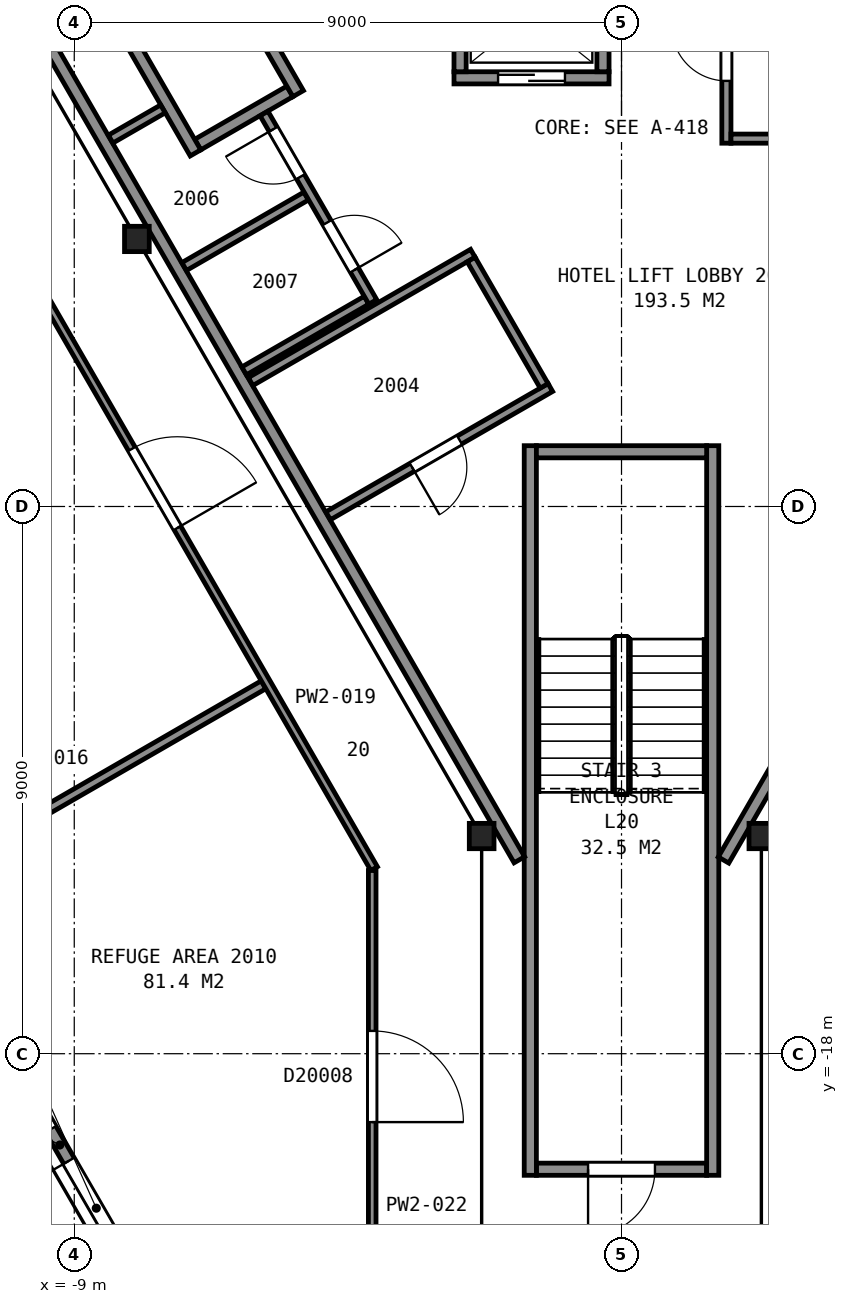
"""IFC4 building model, lengths in metres.
Left out: names, types, materials, properties, quantities, classifications, styles, units other than length and angle.
Written with IfcOpenShell. Run it as: python <this file> out.ifc"""

import sys

from ifc_helpers import new_model, si_unit, direction, frame, frame_2d, origin, origin_2d, place, context, subcontext, project, spatial, rectangle, i_section, extrude, element, fill, save


model = new_model("IFC4")
c1 = context("Model", 3, precision=1e-05, world=origin(), true_north=direction((0.0, 1.0)))
c2 = subcontext(c1, "Body", "Model", "MODEL_VIEW")
j1 = project(units=[si_unit("LENGTHUNIT", "METRE"), si_unit("PLANEANGLEUNIT", "RADIAN")], contexts=[c1])
p1 = place(None, origin())
s1 = spatial("IfcSite", under=j1, at=p1, CompositionType="ELEMENT")
p2 = place(p1, origin())
s2 = spatial("IfcBuilding", under=s1, at=p2, CompositionType="ELEMENT")
p3 = place(p2, frame((0.0, 0.0, 87.2)))
s3 = spatial("IfcBuildingStorey", under=s2, at=p3, CompositionType="ELEMENT", Elevation=87.2)
for number, where, z_axis, x_axis in (
    (1, (-7.97, -4.6, 0.0), (0.0, 0.0, 1.0), (1.0, 0.0, 0.0)),
    (2, (-2.3, -14.42, 0.0), (0.0, 0.0, 1.0), (1.0, 0.0, 0.0)),
    (3, (2.3, -14.42, 0.0), (0.0, 0.0, 1.0), (1.0, 0.0, 0.0)),
):
    element("IfcColumn", number, at=place(p3, frame(where, z_axis=z_axis, x_axis=x_axis)), inside=s3, PredefinedType="COLUMN", context=c2, shape_type="SweptSolid", body=[
        extrude(i_section(OverallWidth=0.406, OverallDepth=0.417, WebThickness=0.03, FlangeThickness=0.048, FilletRadius=0.015, at=origin_2d()), origin(), (0.0, 0.0, 1.0), 5.6),
    ])
p4 = place(p3, frame((-10.188, -17.856, 0.0), z_axis=(0.0, 0.0, 1.0), x_axis=(0.49998037582, -0.866036733513, 0.0)))
e4 = element("IfcWall", 4, at=p4, inside=s3, PredefinedType="SOLIDWALL", context=c2, shape_type="SweptSolid", body=[
    extrude(rectangle(XDim=6.2, YDim=0.2, at=frame_2d((3.1, 0.0))), origin(), (0.0, 0.0, 1.0), 4.323),
])
p5 = place(p4, frame((0.6, 0.0, 0.9)))
e5 = element("IfcOpeningElement", 5, at=p5, cuts=e4, PredefinedType="OPENING", context=c2, shape_type="SweptSolid", body=[
    extrude(rectangle(XDim=1.0, YDim=1.5, at=frame_2d((0.5, 0.75))), frame((0.0, 0.11, 0.0), z_axis=(0.0, -1.0, 0.0), x_axis=(1.0, 0.0, 0.0)), (0.0, 0.0, 1.0), 0.22),
])
p6 = place(p4, frame((2.2, 0.0, 0.0)))
e6 = element("IfcOpeningElement", 6, at=p6, cuts=e4, PredefinedType="OPENING", context=c2, shape_type="SweptSolid", body=[
    extrude(rectangle(XDim=1.8, YDim=2.4, at=frame_2d((0.9, 1.2))), frame((0.0, 0.11, 0.0), z_axis=(0.0, -1.0, 0.0), x_axis=(1.0, 0.0, 0.0)), (0.0, 0.0, 1.0), 0.22),
])
p7 = place(p4, frame((4.6, 0.0, 0.9)))
e7 = element("IfcOpeningElement", 7, at=p7, cuts=e4, PredefinedType="OPENING", context=c2, shape_type="SweptSolid", body=[
    extrude(rectangle(XDim=1.0, YDim=1.5, at=frame_2d((0.5, 0.75))), frame((0.0, 0.11, 0.0), z_axis=(0.0, -1.0, 0.0), x_axis=(1.0, 0.0, 0.0)), (0.0, 0.0, 1.0), 0.22),
])
p8 = place(p3, frame((-1.4, -19.9, 0.0), z_axis=(0.0, 0.0, 1.0), x_axis=(1.0, 0.0, 0.0)))
e8 = element("IfcWall", 8, at=p8, inside=s3, PredefinedType="PARTITIONING", context=c2, shape_type="SweptSolid", body=[
    extrude(rectangle(XDim=2.8, YDim=0.2, at=frame_2d((1.4, 0.0))), origin(), (0.0, 0.0, 1.0), 5.35),
])
p9 = place(p8, frame((0.85, 0.0, 0.0)))
e9 = element("IfcOpeningElement", 9, at=p9, cuts=e8, PredefinedType="OPENING", context=c2, shape_type="SweptSolid", body=[
    extrude(rectangle(XDim=1.1, YDim=2.1, at=frame_2d((0.55, 1.05))), frame((0.0, 0.11, 0.0), z_axis=(0.0, -1.0, 0.0), x_axis=(1.0, 0.0, 0.0)), (0.0, 0.0, 1.0), 0.22),
])
for number, where, z_axis, x_axis in (
    (10, (1.5, -8.0, 0.0), (0.0, 0.0, 1.0), (0.0, -1.0, 0.0)),
    (11, (-1.5, -8.0, 0.0), (0.0, 0.0, 1.0), (0.0, -1.0, 0.0)),
):
    element("IfcWall", number, at=place(p3, frame(where, z_axis=z_axis, x_axis=x_axis)), inside=s3, PredefinedType="PARTITIONING", context=c2, shape_type="SweptSolid", body=[
        extrude(rectangle(XDim=12.0, YDim=0.2, at=frame_2d((6.0, 0.0))), origin(), (0.0, 0.0, 1.0), 5.35),
    ])
p10 = place(p3, frame((-1.4, -8.1, 0.0), z_axis=(0.0, 0.0, 1.0), x_axis=(1.0, 0.0, 0.0)))
e12 = element("IfcWall", 12, at=p10, inside=s3, PredefinedType="PARTITIONING", context=c2, shape_type="SweptSolid", body=[
    extrude(rectangle(XDim=2.8, YDim=0.2, at=frame_2d((1.4, 0.0))), origin(), (0.0, 0.0, 1.0), 5.35),
])
p11 = place(p3, frame((-2.755, -1.95, 0.0), z_axis=(0.0, 0.0, 1.0), x_axis=(1.0, 0.0, 0.0)))
e13 = element("IfcWall", 13, at=p11, inside=s3, PredefinedType="PARTITIONING", context=c2, shape_type="SweptSolid", body=[
    extrude(rectangle(XDim=2.55, YDim=0.2, at=frame_2d((1.275, 0.0))), origin(), (0.0, 0.0, 1.0), 5.6),
])
p12 = place(p11, frame((0.725, 0.0, 0.0)))
e14 = element("IfcOpeningElement", 14, at=p12, cuts=e13, PredefinedType="OPENING", context=c2, shape_type="SweptSolid", body=[
    extrude(rectangle(XDim=1.1, YDim=2.1, at=frame_2d((0.55, 1.05))), frame((0.0, 0.11, 0.0), z_axis=(0.0, -1.0, 0.0), x_axis=(1.0, 0.0, 0.0)), (0.0, 0.0, 1.0), 0.22),
])
for number, where, z_axis, x_axis in (
    (15, (-6.97, -3.048, 0.0), (0.0, 0.0, 1.0), (0.866, 0.5, 0.0)),
    (16, (-0.305, -1.85, 0.0), (0.0, 0.0, 1.0), (0.0, 1.0, 0.0)),
    (17, (-2.655, -1.85, 0.0), (0.0, 0.0, 1.0), (0.0, 1.0, 0.0)),
):
    element("IfcWall", number, at=place(p3, frame(where, z_axis=z_axis, x_axis=x_axis)), inside=s3, PredefinedType="PARTITIONING", context=c2, shape_type="SweptSolid", body=[
        extrude(rectangle(XDim=1.75, YDim=0.2, at=frame_2d((0.875, 0.0))), origin(), (0.0, 0.0, 1.0), 5.6),
    ])
p13 = place(p3, frame((-5.318, -2.21, 0.0), z_axis=(0.0, 0.0, 1.0), x_axis=(-0.499938297808, 0.866061024631, 0.0)))
e18 = element("IfcWall", 18, at=p13, inside=s3, PredefinedType="PARTITIONING", context=c2, shape_type="SweptSolid", body=[
    extrude(rectangle(XDim=2.35, YDim=0.2, at=frame_2d((1.175, 0.0))), origin(), (0.0, 0.0, 1.0), 5.6),
])
p14 = place(p3, frame((-7.006, -3.185, 0.0), z_axis=(0.0, 0.0, 1.0), x_axis=(-0.499990435942, 0.866030925526, 0.0)))
e19 = element("IfcWall", 19, at=p14, inside=s3, PredefinedType="PARTITIONING", context=c2, shape_type="SweptSolid", body=[
    extrude(rectangle(XDim=2.55, YDim=0.2, at=frame_2d((1.275, 0.0))), origin(), (0.0, 0.0, 1.0), 5.6),
])
p15 = place(p3, frame((-13.664, 5.946, 0.0), z_axis=(0.0, 0.0, 1.0), x_axis=(0.499994327219, -0.866028678941, 0.0)))
e20 = element("IfcWall", 20, at=p15, inside=s3, PredefinedType="PARTITIONING", context=c2, shape_type="SweptSolid", body=[
    extrude(rectangle(XDim=23.968, YDim=0.2, at=frame_2d((11.984, 0.0))), origin(), (0.0, 0.0, 1.0), 5.35),
])
p16 = place(p3, frame((-8.402, -2.958, 0.0), z_axis=(0.0, 0.0, 1.0), x_axis=(0.866025935826, 0.499999078476, 0.0)))
e21 = element("IfcWall", 21, at=p16, inside=s3, PredefinedType="PARTITIONING", context=c2, shape_type="SweptSolid", body=[
    extrude(rectangle(XDim=0.993, YDim=0.15, at=frame_2d((0.497, 0.0))), origin(), (0.0, 0.0, 1.0), 5.35),
])
p17 = place(p3, frame((-7.192, -5.053, 0.0), z_axis=(0.0, 0.0, 1.0), x_axis=(0.865851878631, 0.500300434011, 0.0)))
e22 = element("IfcWall", 22, at=p17, inside=s3, PredefinedType="PARTITIONING", context=c2, shape_type="SweptSolid", body=[
    extrude(rectangle(XDim=2.315, YDim=0.15, at=frame_2d((1.158, 0.0))), origin(), (0.0, 0.0, 1.0), 5.35),
])
p18 = place(p3, frame((-6.206, -6.77, 0.0), z_axis=(0.0, 0.0, 1.0), x_axis=(0.865998469481, 0.500046648681, 0.0)))
e23 = element("IfcWall", 23, at=p18, inside=s3, PredefinedType="PARTITIONING", context=c2, shape_type="SweptSolid", body=[
    extrude(rectangle(XDim=2.325, YDim=0.15, at=frame_2d((1.163, 0.0))), origin(), (0.0, 0.0, 1.0), 5.35),
])
p19 = place(p3, frame((-6.1, -6.946, 0.0), z_axis=(0.0, 0.0, 1.0), x_axis=(0.866038200431, 0.499977834903, 0.0)))
e24 = element("IfcWall", 24, at=p19, inside=s3, PredefinedType="PARTITIONING", context=c2, shape_type="SweptSolid", body=[
    extrude(rectangle(XDim=4.22, YDim=0.15, at=frame_2d((2.11, 0.0))), origin(), (0.0, 0.0, 1.0), 5.35),
])
p20 = place(p3, frame((-4.091, -5.635, 0.0), z_axis=(0.0, 0.0, 1.0), x_axis=(-0.499948934428, 0.866054884499, 0.0)))
e25 = element("IfcWall", 25, at=p20, inside=s3, PredefinedType="PARTITIONING", context=c2, shape_type="SweptSolid", body=[
    extrude(rectangle(XDim=3.577, YDim=0.15, at=frame_2d((1.789, 0.0))), origin(), (0.0, 0.0, 1.0), 5.35),
])
p21 = place(p20, frame((2.377, 0.0, 0.0)))
e26 = element("IfcOpeningElement", 26, at=p21, cuts=e25, PredefinedType="OPENING", context=c2, shape_type="SweptSolid", body=[
    extrude(rectangle(XDim=0.9, YDim=2.1, at=frame_2d((0.45, 1.05))), frame((0.0, 0.085, 0.0), z_axis=(0.0, -1.0, 0.0), x_axis=(1.0, 0.0, 0.0)), (0.0, 0.0, 1.0), 0.17),
])
p22 = place(p20, frame((0.605, 0.0, 0.0)))
e27 = element("IfcOpeningElement", 27, at=p22, cuts=e25, PredefinedType="OPENING", context=c2, shape_type="SweptSolid", body=[
    extrude(rectangle(XDim=0.9, YDim=2.1, at=frame_2d((0.45, 1.05))), frame((0.0, 0.085, 0.0), z_axis=(0.0, -1.0, 0.0), x_axis=(1.0, 0.0, 0.0)), (0.0, 0.0, 1.0), 0.17),
])
p23 = place(p3, frame((-4.825, -9.154, 0.0), z_axis=(0.0, 0.0, 1.0), x_axis=(0.866023738697, 0.500002884005, 0.0)))
e28 = element("IfcWall", 28, at=p23, inside=s3, PredefinedType="PARTITIONING", context=c2, shape_type="SweptSolid", body=[
    extrude(rectangle(XDim=4.22, YDim=0.15, at=frame_2d((2.11, 0.0))), origin(), (0.0, 0.0, 1.0), 5.35),
])
p24 = place(p23, frame((1.595, 0.0, 0.0)))
e29 = element("IfcOpeningElement", 29, at=p24, cuts=e28, PredefinedType="OPENING", context=c2, shape_type="SweptSolid", body=[
    extrude(rectangle(XDim=0.9, YDim=2.1, at=frame_2d((0.45, 1.05))), frame((0.0, 0.085, 0.0), z_axis=(0.0, -1.0, 0.0), x_axis=(1.0, 0.0, 0.0)), (0.0, 0.0, 1.0), 0.17),
])
p25 = place(p3, frame((-2.472, -4.938, 0.0), z_axis=(0.0, 0.0, 1.0), x_axis=(0.500045362686, -0.865999212041, 0.0)))
e30 = element("IfcWall", 30, at=p25, inside=s3, PredefinedType="PARTITIONING", context=c2, shape_type="SweptSolid", body=[
    extrude(rectangle(XDim=2.4, YDim=0.15, at=frame_2d((1.2, 0.0))), origin(), (0.0, 0.0, 1.0), 5.35),
])
p26 = place(p3, frame((1.677, -14.815, 0.0), z_axis=(0.0, 0.0, 1.0), x_axis=(0.49999445743, 0.866028603765, 0.0)))
e31 = element("IfcWall", 31, at=p26, inside=s3, PredefinedType="PARTITIONING", context=c2, shape_type="SweptSolid", body=[
    extrude(rectangle(XDim=5.905, YDim=0.2, at=frame_2d((2.952, 0.0))), origin(), (0.0, 0.0, 1.0), 5.35),
])
p27 = place(p26, frame((3.855, 0.0, 0.0)))
e32 = element("IfcOpeningElement", 32, at=p27, cuts=e31, PredefinedType="OPENING", context=c2, shape_type="SweptSolid", body=[
    extrude(rectangle(XDim=1.8, YDim=2.1, at=frame_2d((0.9, 1.05))), frame((0.0, 0.11, 0.0), z_axis=(0.0, -1.0, 0.0), x_axis=(1.0, 0.0, 0.0)), (0.0, 0.0, 1.0), 0.22),
])
p28 = place(p3, frame((1.725, -0.102, 0.0), z_axis=(0.0, 0.0, 1.0), x_axis=(0.0, -1.0, 0.0)))
e33 = element("IfcWall", 33, at=p28, inside=s3, PredefinedType="PARTITIONING", context=c2, shape_type="SweptSolid", body=[
    extrude(rectangle(XDim=2.923, YDim=0.15, at=frame_2d((1.461, 0.0))), origin(), (0.0, 0.0, 1.0), 5.35),
])
p29 = place(p28, frame((0.998, 0.0, 0.0)))
e34 = element("IfcOpeningElement", 34, at=p29, cuts=e33, PredefinedType="OPENING", context=c2, shape_type="SweptSolid", body=[
    extrude(rectangle(XDim=0.9, YDim=2.1, at=frame_2d((0.45, 1.05))), frame((0.0, 0.085, 0.0), z_axis=(0.0, -1.0, 0.0), x_axis=(1.0, 0.0, 0.0)), (0.0, 0.0, 1.0), 0.17),
])
p30 = place(p3, frame((1.8, -2.95, 0.0), z_axis=(0.0, 0.0, 1.0), x_axis=(1.0, 0.0, 0.0)))
e35 = element("IfcWall", 35, at=p30, inside=s3, PredefinedType="PARTITIONING", context=c2, shape_type="SweptSolid", body=[
    extrude(rectangle(XDim=2.4, YDim=0.15, at=frame_2d((1.2, 0.0))), origin(), (0.0, 0.0, 1.0), 5.35),
])
p31 = place(p3, frame((-11.595, -15.227, 0.0), z_axis=(0.0, 0.0, 1.0), x_axis=(0.866055429303, 0.49994799067, 0.0)))
e36 = element("IfcWall", 36, at=p31, inside=s3, PredefinedType="PARTITIONING", context=c2, shape_type="SweptSolid", body=[
    extrude(rectangle(XDim=6.591, YDim=0.15, at=frame_2d((3.295, 0.0))), origin(), (0.0, 0.0, 1.0), 4.262),
])
p32 = place(p3, frame((-4.069, -14.956, 0.0), z_axis=(0.0, 0.0, 1.0), x_axis=(-0.500012742938, 0.866018046521, 0.0)))
e37 = element("IfcWall", 37, at=p32, inside=s3, PredefinedType="PARTITIONING", context=c2, shape_type="SweptSolid", body=[
    extrude(rectangle(XDim=10.92, YDim=0.125, at=frame_2d((5.46, 0.0))), origin(), (0.0, 0.0, 1.0), 4.262),
])
p33 = place(p32, frame((6.47, 0.0, 0.0)))
e38 = element("IfcOpeningElement", 38, at=p33, cuts=e37, PredefinedType="OPENING", context=c2, shape_type="SweptSolid", body=[
    extrude(rectangle(XDim=1.5, YDim=2.1, at=frame_2d((0.75, 1.05))), frame((0.0, 0.073, 0.0), z_axis=(0.0, -1.0, 0.0), x_axis=(1.0, 0.0, 0.0)), (0.0, 0.0, 1.0), 0.145),
])
p34 = place(p3, frame((-4.1, -21.887, 0.0), z_axis=(0.0, 0.0, 1.0), x_axis=(0.0, 1.0, 0.0)))
e39 = element("IfcWall", 39, at=p34, inside=s3, PredefinedType="PARTITIONING", context=c2, shape_type="SweptSolid", body=[
    extrude(rectangle(XDim=6.9, YDim=0.125, at=frame_2d((3.45, 0.0))), origin(), (0.0, 0.0, 1.0), 4.262),
])
p35 = place(p34, frame((2.762, 0.0, 0.0)))
e40 = element("IfcOpeningElement", 40, at=p35, cuts=e39, PredefinedType="OPENING", context=c2, shape_type="SweptSolid", body=[
    extrude(rectangle(XDim=1.5, YDim=2.1, at=frame_2d((0.75, 1.05))), frame((0.0, 0.073, 0.0), z_axis=(0.0, -1.0, 0.0), x_axis=(1.0, 0.0, 0.0)), (0.0, 0.0, 1.0), 0.145),
])
p36 = place(p5, origin())
e41 = element("IfcWindow", 41, at=p36, inside=s3, PartitioningType="SINGLE_PANEL", PredefinedType="WINDOW", context=c2, shape_type="SweptSolid", body=[
    extrude(rectangle(XDim=1.0, YDim=1.5, at=frame_2d((0.5, 0.75))), frame((0.0, 0.03, 0.0), z_axis=(0.0, -1.0, 0.0), x_axis=(1.0, 0.0, 0.0)), (0.0, 0.0, 1.0), 0.06),
])
fill(e5, e41)
p37 = place(p6, frame((1.8, 0.0, 0.0), z_axis=(0.0, 0.0, 1.0), x_axis=(-1.0, 0.0, 0.0)))
e42 = element("IfcDoor", 42, at=p37, inside=s3, OperationType="DOUBLE_DOOR_SINGLE_SWING", PredefinedType="DOOR", context=c2, shape_type="SweptSolid", body=[
    extrude(rectangle(XDim=1.8, YDim=2.4, at=frame_2d((0.9, 1.2))), frame((0.0, 0.025, 0.0), z_axis=(0.0, -1.0, 0.0), x_axis=(1.0, 0.0, 0.0)), (0.0, 0.0, 1.0), 0.05),
])
fill(e6, e42)
p38 = place(p9, origin())
e43 = element("IfcDoor", 43, at=p38, inside=s3, OperationType="SINGLE_SWING_LEFT", PredefinedType="DOOR", context=c2, shape_type="SweptSolid", body=[
    extrude(rectangle(XDim=1.1, YDim=2.1, at=frame_2d((0.55, 1.05))), frame((0.0, 0.025, 0.0), z_axis=(0.0, -1.0, 0.0), x_axis=(1.0, 0.0, 0.0)), (0.0, 0.0, 1.0), 0.05),
])
fill(e9, e43)
p39 = place(p12, origin())
e44 = element("IfcDoor", 44, at=p39, inside=s3, OperationType="SLIDING_TO_RIGHT", PredefinedType="DOOR", context=c2, shape_type="SweptSolid", body=[
    extrude(rectangle(XDim=1.1, YDim=2.1, at=frame_2d((0.55, 1.05))), frame((0.0, 0.025, 0.0), z_axis=(0.0, -1.0, 0.0), x_axis=(1.0, 0.0, 0.0)), (0.0, 0.0, 1.0), 0.05),
])
fill(e14, e44)
p40 = place(p21, origin())
e45 = element("IfcDoor", 45, at=p40, inside=s3, OperationType="SINGLE_SWING_RIGHT", PredefinedType="DOOR", context=c2, shape_type="SweptSolid", body=[
    extrude(rectangle(XDim=0.9, YDim=2.1, at=frame_2d((0.45, 1.05))), frame((0.0, 0.025, 0.0), z_axis=(0.0, -1.0, 0.0), x_axis=(1.0, 0.0, 0.0)), (0.0, 0.0, 1.0), 0.05),
])
fill(e26, e45)
p41 = place(p22, origin())
e46 = element("IfcDoor", 46, at=p41, inside=s3, OperationType="SINGLE_SWING_LEFT", PredefinedType="DOOR", context=c2, shape_type="SweptSolid", body=[
    extrude(rectangle(XDim=0.9, YDim=2.1, at=frame_2d((0.45, 1.05))), frame((0.0, 0.025, 0.0), z_axis=(0.0, -1.0, 0.0), x_axis=(1.0, 0.0, 0.0)), (0.0, 0.0, 1.0), 0.05),
])
fill(e27, e46)
p42 = place(p24, origin())
e47 = element("IfcDoor", 47, at=p42, inside=s3, OperationType="SINGLE_SWING_LEFT", PredefinedType="DOOR", context=c2, shape_type="SweptSolid", body=[
    extrude(rectangle(XDim=0.9, YDim=2.1, at=frame_2d((0.45, 1.05))), frame((0.0, 0.025, 0.0), z_axis=(0.0, -1.0, 0.0), x_axis=(1.0, 0.0, 0.0)), (0.0, 0.0, 1.0), 0.05),
])
fill(e29, e47)
p43 = place(p29, origin())
e48 = element("IfcDoor", 48, at=p43, inside=s3, OperationType="SINGLE_SWING_LEFT", PredefinedType="DOOR", context=c2, shape_type="SweptSolid", body=[
    extrude(rectangle(XDim=0.9, YDim=2.1, at=frame_2d((0.45, 1.05))), frame((0.0, 0.025, 0.0), z_axis=(0.0, -1.0, 0.0), x_axis=(1.0, 0.0, 0.0)), (0.0, 0.0, 1.0), 0.05),
])
fill(e34, e48)
p44 = place(p33, origin())
e49 = element("IfcDoor", 49, at=p44, inside=s3, OperationType="DOUBLE_DOOR_SINGLE_SWING", PredefinedType="DOOR", context=c2, shape_type="SweptSolid", body=[
    extrude(rectangle(XDim=1.5, YDim=2.1, at=frame_2d((0.75, 1.05))), frame((0.0, 0.025, 0.0), z_axis=(0.0, -1.0, 0.0), x_axis=(1.0, 0.0, 0.0)), (0.0, 0.0, 1.0), 0.05),
])
fill(e38, e49)
p45 = place(p35, origin())
e50 = element("IfcDoor", 50, at=p45, inside=s3, OperationType="DOUBLE_DOOR_SINGLE_SWING", PredefinedType="DOOR", context=c2, shape_type="SweptSolid", body=[
    extrude(rectangle(XDim=1.5, YDim=2.1, at=frame_2d((0.75, 1.05))), frame((0.0, 0.025, 0.0), z_axis=(0.0, -1.0, 0.0), x_axis=(1.0, 0.0, 0.0)), (0.0, 0.0, 1.0), 0.05),
])
fill(e40, e50)
save(model, sys.argv[1])
